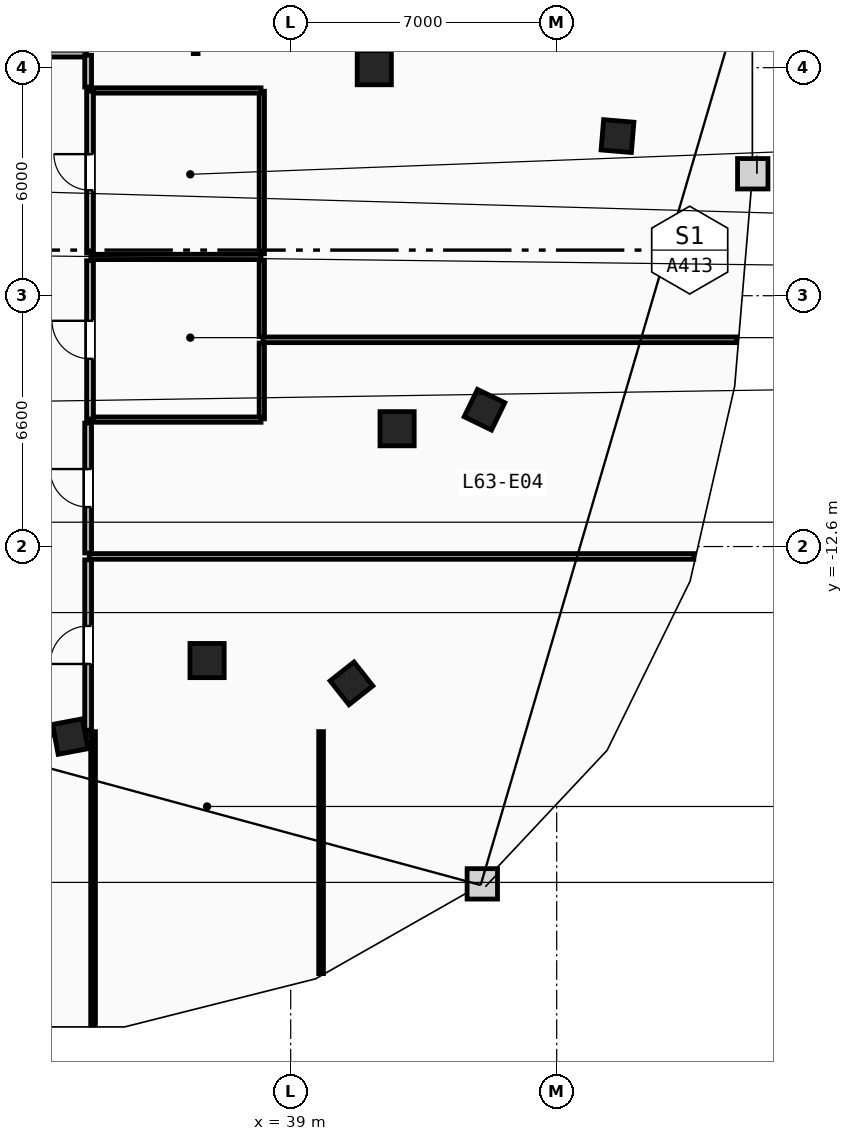
"""IFC4 building model, lengths in metres.
Left out: names, types, materials, properties, quantities, classifications, styles, units other than length and angle.
Written with IfcOpenShell. Run it as: python <this file> out.ifc"""

import sys

from ifc_helpers import new_model, si_unit, direction, frame, frame_2d, origin, origin_2d, place, context, subcontext, project, spatial, rectangle, extrude, element, fill, save


model = new_model("IFC4")
c1 = context("Model", 3, precision=1e-05, world=origin(), true_north=direction((0.0, 1.0)))
c2 = subcontext(c1, "Body", "Model", "MODEL_VIEW")
j1 = project(units=[si_unit("LENGTHUNIT", "METRE"), si_unit("PLANEANGLEUNIT", "RADIAN")], contexts=[c1])
p1 = place(None, origin())
s1 = spatial("IfcSite", under=j1, at=p1, CompositionType="ELEMENT")
p2 = place(p1, origin())
s2 = spatial("IfcBuilding", under=s1, at=p2, CompositionType="ELEMENT")
p3 = place(p2, frame((0.0, 0.0, 239.6)))
s3 = spatial("IfcBuildingStorey", under=s2, at=p3, CompositionType="ELEMENT", Elevation=239.6)
for number, where, z_axis, x_axis in (
    (1, (41.2, 0.0, 0.0), (0.0, 0.0, 1.0), (1.0, 0.0, 0.0)),
    (2, (41.8, -9.5, 0.0), (0.0, 0.0, 1.0), (1.0, 0.0, 0.0)),
    (3, (36.8, -15.6, 0.0), (0.0, 0.0, 1.0), (1.0, 0.0, 0.0)),
):
    element("IfcColumn", number, at=place(p3, frame(where, z_axis=z_axis, x_axis=x_axis)), inside=s3, PredefinedType="COLUMN", context=c2, shape_type="SweptSolid", body=[
        extrude(rectangle(XDim=0.9, YDim=0.9, at=origin_2d()), origin(), (0.0, 0.0, 1.0), 3.6),
    ])
for number, where, z_axis, x_axis in (
    (4, (33.2, -17.6, 0.0), (0.0, 0.0, 1.0), (0.983, 0.186, 0.0)),
    (5, (40.6, -16.2, 0.0), (0.0, 0.0, 1.0), (0.785, 0.619, 0.0)),
    (6, (44.1, -9.0, 0.0), (0.0, 0.0, 1.0), (0.437, 0.899, 0.0)),
    (7, (47.6, -1.8, 0.0), (0.0, 0.0, 1.0), (0.084, 0.997, 0.0)),
):
    element("IfcColumn", number, at=place(p3, frame(where, z_axis=z_axis, x_axis=x_axis)), inside=s3, PredefinedType="COLUMN", context=c2, shape_type="SweptSolid", body=[
        extrude(rectangle(XDim=0.8, YDim=0.8, at=origin_2d()), origin(), (0.0, 0.0, 1.0), 3.6),
    ])
p4 = place(p3, frame((38.24, -9.24, 0.0), z_axis=(0.0, 0.0, 1.0), x_axis=(0.0, 1.0, 0.0)))
e8 = element("IfcWall", 8, at=p4, inside=s3, PredefinedType="PARTITIONING", context=c2, shape_type="SweptSolid", body=[
    extrude(rectangle(XDim=1.995, YDim=0.14, at=frame_2d((0.998, 0.0))), origin(), (0.0, 0.0, 1.0), 3.34),
])
p5 = place(p3, frame((38.24, -7.075, 0.0), z_axis=(0.0, 0.0, 1.0), x_axis=(0.0, 1.0, 0.0)))
e9 = element("IfcWall", 9, at=p5, inside=s3, PredefinedType="PARTITIONING", context=c2, shape_type="SweptSolid", body=[
    extrude(rectangle(XDim=2.01, YDim=0.14, at=frame_2d((1.005, 0.0))), origin(), (0.0, 0.0, 1.0), 3.34),
])
p6 = place(p3, frame((38.24, -4.895, 0.0), z_axis=(0.0, 0.0, 1.0), x_axis=(0.0, 1.0, 0.0)))
e10 = element("IfcWall", 10, at=p6, inside=s3, PredefinedType="PARTITIONING", context=c2, shape_type="SweptSolid", body=[
    extrude(rectangle(XDim=4.275, YDim=0.14, at=frame_2d((2.137, 0.0))), origin(), (0.0, 0.0, 1.0), 3.34),
])
for number, where, z_axis, x_axis in (
    (11, (33.74, -0.6, 0.0), (0.0, 0.0, 1.0), (1.0, 0.0, 0.0)),
    (12, (33.74, -4.98, 0.0), (0.0, 0.0, 1.0), (1.0, 0.0, 0.0)),
    (13, (33.74, -9.26, 0.0), (0.0, 0.0, 1.0), (1.0, 0.0, 0.0)),
):
    element("IfcWall", number, at=place(p3, frame(where, z_axis=z_axis, x_axis=x_axis)), inside=s3, PredefinedType="PARTITIONING", context=c2, shape_type="SweptSolid", body=[
        extrude(rectangle(XDim=4.48, YDim=0.14, at=frame_2d((2.24, 0.0))), origin(), (0.0, 0.0, 1.0), 3.34),
    ])
p7 = place(p3, frame((33.72, -4.88, 0.0), z_axis=(0.0, 0.0, 1.0), x_axis=(0.0, 1.0, 0.0)))
e14 = element("IfcWall", 14, at=p7, inside=s3, PredefinedType="PARTITIONING", context=c2, shape_type="SweptSolid", body=[
    extrude(rectangle(XDim=4.26, YDim=0.18, at=frame_2d((2.13, 0.0))), origin(), (0.0, 0.0, 1.0), 3.34),
])
p8 = place(p7, frame((1.655, 0.0, 0.0)))
e15 = element("IfcOpeningElement", 15, at=p8, cuts=e14, PredefinedType="OPENING", context=c2, shape_type="SweptSolid", body=[
    extrude(rectangle(XDim=0.95, YDim=2.1, at=frame_2d((0.475, 1.05))), frame((0.0, 0.1, 0.0), z_axis=(0.0, -1.0, 0.0), x_axis=(1.0, 0.0, 0.0)), (0.0, 0.0, 1.0), 0.2),
])
p9 = place(p3, frame((33.72, -9.24, 0.0), z_axis=(0.0, 0.0, 1.0), x_axis=(0.0, 1.0, 0.0)))
e16 = element("IfcWall", 16, at=p9, inside=s3, PredefinedType="PARTITIONING", context=c2, shape_type="SweptSolid", body=[
    extrude(rectangle(XDim=4.16, YDim=0.18, at=frame_2d((2.08, 0.0))), origin(), (0.0, 0.0, 1.0), 3.34),
])
p10 = place(p9, frame((1.58, 0.0, 0.0)))
e17 = element("IfcOpeningElement", 17, at=p10, cuts=e16, PredefinedType="OPENING", context=c2, shape_type="SweptSolid", body=[
    extrude(rectangle(XDim=1.0, YDim=2.15, at=frame_2d((0.5, 1.075))), frame((0.0, 0.1, 0.0), z_axis=(0.0, -1.0, 0.0), x_axis=(1.0, 0.0, 0.0)), (0.0, 0.0, 1.0), 0.2),
])
p11 = place(p3, frame((36.5, 0.37, 0.0), z_axis=(0.0, 0.0, 1.0), x_axis=(0.0, 1.0, 0.0)))
e18 = element("IfcWall", 18, at=p11, inside=s3, PredefinedType="PARTITIONING", context=c2, shape_type="SweptSolid", body=[
    extrude(rectangle(XDim=24.348, YDim=0.125, at=frame_2d((12.174, 0.0))), origin(), (0.0, 0.0, 1.0), 3.34),
])
p12 = place(p3, frame((38.27, -7.16, 0.0), z_axis=(0.0, 0.0, 1.0), x_axis=(1.0, 0.0, 0.0)))
e19 = element("IfcWall", 19, at=p12, inside=s3, PredefinedType="PARTITIONING", context=c2, shape_type="SweptSolid", body=[
    extrude(rectangle(XDim=12.466, YDim=0.15, at=frame_2d((6.233, 0.0))), origin(), (0.0, 0.0, 1.0), 3.34),
])
p13 = place(p3, frame((33.7, -12.86, 0.0), z_axis=(0.0, 0.0, 1.0), x_axis=(1.0, 0.0, 0.0)))
e20 = element("IfcWall", 20, at=p13, inside=s3, PredefinedType="PARTITIONING", context=c2, shape_type="SweptSolid", body=[
    extrude(rectangle(XDim=15.908, YDim=0.15, at=frame_2d((7.954, 0.0))), origin(), (0.0, 0.0, 1.0), 3.34),
])
p14 = place(p3, frame((33.8, -25.19, 0.0), z_axis=(0.0, 0.0, 1.0), x_axis=(0.0, 1.0, 0.0)))
e21 = element("IfcWall", 21, at=p14, inside=s3, PredefinedType="PARTITIONING", context=c2, shape_type="SweptSolid", body=[
    extrude(rectangle(XDim=7.72, YDim=0.125, at=frame_2d((3.86, 0.0))), origin(), (0.0, 0.0, 1.0), 3.34),
])
p15 = place(p3, frame((39.8, -23.837, 0.0), z_axis=(0.0, 0.0, 1.0), x_axis=(0.0, 1.0, 0.0)))
e22 = element("IfcWall", 22, at=p15, inside=s3, PredefinedType="PARTITIONING", context=c2, shape_type="SweptSolid", body=[
    extrude(rectangle(XDim=6.367, YDim=0.125, at=frame_2d((3.184, 0.0))), origin(), (0.0, 0.0, 1.0), 3.34),
])
p16 = place(p3, frame((26.89, -17.47, 0.0), z_axis=(0.0, 0.0, 1.0), x_axis=(1.0, 0.0, 0.0)))
e23 = element("IfcWall", 23, at=p16, inside=s3, PredefinedType="PARTITIONING", context=c2, shape_type="SweptSolid", body=[
    extrude(rectangle(XDim=6.739, YDim=0.18, at=frame_2d((3.369, 0.0))), origin(), (0.0, 0.0, 1.0), 3.34),
])
p17 = place(p16, frame((2.869, 0.0, 0.0)))
e24 = element("IfcOpeningElement", 24, at=p17, cuts=e23, PredefinedType="OPENING", context=c2, shape_type="SweptSolid", body=[
    extrude(rectangle(XDim=1.0, YDim=2.15, at=frame_2d((0.5, 1.075))), frame((0.0, 0.1, 0.0), z_axis=(0.0, -1.0, 0.0), x_axis=(1.0, 0.0, 0.0)), (0.0, 0.0, 1.0), 0.2),
])
p18 = place(p3, frame((33.67, -17.43, 0.0), z_axis=(0.0, 0.0, 1.0), x_axis=(0.0, 1.0, 0.0)))
e25 = element("IfcWall", 25, at=p18, inside=s3, PredefinedType="PARTITIONING", context=c2, shape_type="SweptSolid", body=[
    extrude(rectangle(XDim=4.48, YDim=0.18, at=frame_2d((2.24, 0.0))), origin(), (0.0, 0.0, 1.0), 3.34),
])
p19 = place(p18, frame((1.74, 0.0, 0.0)))
e26 = element("IfcOpeningElement", 26, at=p19, cuts=e25, PredefinedType="OPENING", context=c2, shape_type="SweptSolid", body=[
    extrude(rectangle(XDim=1.0, YDim=2.15, at=frame_2d((0.5, 1.075))), frame((0.0, 0.1, 0.0), z_axis=(0.0, -1.0, 0.0), x_axis=(1.0, 0.0, 0.0)), (0.0, 0.0, 1.0), 0.2),
])
p20 = place(p3, frame((33.67, -12.77, 0.0), z_axis=(0.0, 0.0, 1.0), x_axis=(0.0, 1.0, 0.0)))
e27 = element("IfcWall", 27, at=p20, inside=s3, PredefinedType="PARTITIONING", context=c2, shape_type="SweptSolid", body=[
    extrude(rectangle(XDim=3.419, YDim=0.18, at=frame_2d((1.709, 0.0))), origin(), (0.0, 0.0, 1.0), 3.34),
])
p21 = place(p20, frame((1.209, 0.0, 0.0)))
e28 = element("IfcOpeningElement", 28, at=p21, cuts=e27, PredefinedType="OPENING", context=c2, shape_type="SweptSolid", body=[
    extrude(rectangle(XDim=1.0, YDim=2.15, at=frame_2d((0.5, 1.075))), frame((0.0, 0.1, 0.0), z_axis=(0.0, -1.0, 0.0), x_axis=(1.0, 0.0, 0.0)), (0.0, 0.0, 1.0), 0.2),
])
p22 = place(p3, frame((33.628, 0.37, 0.0), z_axis=(0.0, 0.0, 1.0), x_axis=(-1.0, 0.0, 0.0)))
e29 = element("IfcWall", 29, at=p22, inside=s3, PredefinedType="PARTITIONING", context=c2, shape_type="SweptSolid", body=[
    extrude(rectangle(XDim=2.729, YDim=0.18, at=frame_2d((1.364, 0.0))), origin(), (0.0, 0.0, 1.0), 3.34),
])
p23 = place(p3, frame((33.67, -0.509, 0.0), z_axis=(0.0, 0.0, 1.0), x_axis=(0.0, 1.0, 0.0)))
e30 = element("IfcWall", 30, at=p23, inside=s3, PredefinedType="PARTITIONING", context=c2, shape_type="SweptSolid", body=[
    extrude(rectangle(XDim=0.837, YDim=0.18, at=frame_2d((0.418, 0.0))), origin(), (0.0, 0.0, 1.0), 3.34),
])
p24 = place(p19, origin())
e31 = element("IfcDoor", 31, at=p24, inside=s3, OperationType="SINGLE_SWING_LEFT", PredefinedType="DOOR", context=c2, shape_type="SweptSolid", body=[
    extrude(rectangle(XDim=1.0, YDim=2.15, at=frame_2d((0.5, 1.075))), frame((0.0, 0.025, 0.0), z_axis=(0.0, -1.0, 0.0), x_axis=(1.0, 0.0, 0.0)), (0.0, 0.0, 1.0), 0.05),
])
fill(e26, e31)
p25 = place(p8, origin())
e32 = element("IfcDoor", 32, at=p25, inside=s3, OperationType="SINGLE_SWING_RIGHT", PredefinedType="DOOR", context=c2, shape_type="SweptSolid", body=[
    extrude(rectangle(XDim=0.95, YDim=2.1, at=frame_2d((0.475, 1.05))), frame((0.0, 0.025, 0.0), z_axis=(0.0, -1.0, 0.0), x_axis=(1.0, 0.0, 0.0)), (0.0, 0.0, 1.0), 0.05),
])
fill(e15, e32)
p26 = place(p10, origin())
e33 = element("IfcDoor", 33, at=p26, inside=s3, OperationType="SINGLE_SWING_RIGHT", PredefinedType="DOOR", context=c2, shape_type="SweptSolid", body=[
    extrude(rectangle(XDim=1.0, YDim=2.15, at=frame_2d((0.5, 1.075))), frame((0.0, 0.025, 0.0), z_axis=(0.0, -1.0, 0.0), x_axis=(1.0, 0.0, 0.0)), (0.0, 0.0, 1.0), 0.05),
])
fill(e17, e33)
p27 = place(p21, origin())
e34 = element("IfcDoor", 34, at=p27, inside=s3, OperationType="SINGLE_SWING_RIGHT", PredefinedType="DOOR", context=c2, shape_type="SweptSolid", body=[
    extrude(rectangle(XDim=1.0, YDim=2.15, at=frame_2d((0.5, 1.075))), frame((0.0, 0.025, 0.0), z_axis=(0.0, -1.0, 0.0), x_axis=(1.0, 0.0, 0.0)), (0.0, 0.0, 1.0), 0.05),
])
fill(e28, e34)
save(model, sys.argv[1])
